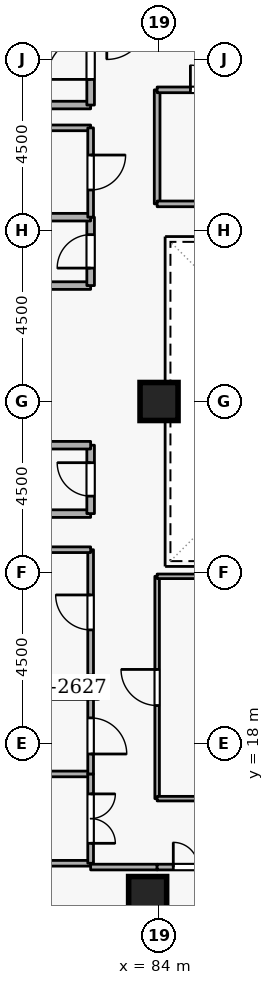
"""IFC4 building model, lengths in metres.
Left out: names, types, materials, properties, quantities, classifications, styles, units other than length and angle.
Written with IfcOpenShell. Run it as: python <this file> out.ifc"""

import sys

from ifc_helpers import new_model, si_unit, direction, frame, frame_2d, origin, origin_2d, place, context, subcontext, project, spatial, rectangle, extrude, element, fill, save


model = new_model("IFC4")
c1 = context("Model", 3, precision=1e-05, world=origin(), true_north=direction((0.0, 1.0)))
c2 = subcontext(c1, "Body", "Model", "MODEL_VIEW")
j1 = project(units=[si_unit("LENGTHUNIT", "METRE"), si_unit("PLANEANGLEUNIT", "RADIAN")], contexts=[c1])
p1 = place(None, origin())
s1 = spatial("IfcSite", under=j1, at=p1, CompositionType="ELEMENT")
p2 = place(p1, origin())
s2 = spatial("IfcBuilding", under=s1, at=p2, CompositionType="ELEMENT")
p3 = place(p2, frame((0.0, 0.0, 218.1)))
s3 = spatial("IfcBuildingStorey", under=s2, at=p3, CompositionType="ELEMENT", Elevation=218.1)
p4 = place(p3, frame((76.6, 19.45, 0.0), z_axis=(0.0, 0.0, 1.0), x_axis=(1.0, 0.0, 0.0)))
e1 = element("IfcWall", 1, at=p4, inside=s3, PredefinedType="SHEAR", context=c2, shape_type="SweptSolid", body=[
    extrude(rectangle(XDim=5.8, YDim=0.5, at=frame_2d((2.9, 0.0))), origin(), (0.0, 0.0, 1.0), 3.6),
])
for number, where, z_axis, x_axis in (
    (2, (83.7, 14.0, 0.0), (0.0, 0.0, 1.0), (1.0, 0.0, 0.0)),
    (3, (84.0, 27.0, 0.0), (0.0, 0.0, 1.0), (1.0, 0.0, 0.0)),
):
    element("IfcColumn", number, at=place(p3, frame(where, z_axis=z_axis, x_axis=x_axis)), inside=s3, PredefinedType="COLUMN", context=c2, shape_type="SweptSolid", body=[
        extrude(rectangle(XDim=1.0, YDim=1.0, at=origin_2d()), origin(), (0.0, 0.0, 1.0), 3.6),
    ])
p5 = place(p3, frame((79.9, 34.8, 0.0), z_axis=(0.0, 0.0, 1.0), x_axis=(1.0, 0.0, 0.0)))
e4 = element("IfcWall", 4, at=p5, inside=s3, PredefinedType="STANDARD", context=c2, shape_type="SweptSolid", body=[
    extrude(rectangle(XDim=2.3, YDim=0.2, at=frame_2d((1.15, 0.0))), origin(), (0.0, 0.0, 1.0), 2.465),
])
p6 = place(p3, frame((82.2, 34.8, 0.0), z_axis=(0.0, 0.0, 1.0), x_axis=(0.0, 1.0, 0.0)))
e5 = element("IfcWall", 5, at=p6, inside=s3, PredefinedType="STANDARD", context=c2, shape_type="SweptSolid", body=[
    extrude(rectangle(XDim=2.5, YDim=0.2, at=frame_2d((1.25, 0.0))), origin(), (0.0, 0.0, 1.0), 3.26),
])
p7 = place(p6, frame((0.675, 0.0, 0.0)))
e6 = element("IfcOpeningElement", 6, at=p7, cuts=e5, PredefinedType="OPENING", context=c2, shape_type="SweptSolid", body=[
    extrude(rectangle(XDim=1.15, YDim=2.1, at=frame_2d((0.575, 1.05))), frame((0.0, 0.11, 0.0), z_axis=(0.0, -1.0, 0.0), x_axis=(1.0, 0.0, 0.0)), (0.0, 0.0, 1.0), 0.22),
])
p8 = place(p3, frame((80.15, 24.05, 0.0), z_axis=(0.0, 0.0, 1.0), x_axis=(1.0, 0.0, 0.0)))
e7 = element("IfcWall", 7, at=p8, inside=s3, PredefinedType="STANDARD", context=c2, shape_type="SweptSolid", body=[
    extrude(rectangle(XDim=2.05, YDim=0.2, at=frame_2d((1.025, 0.0))), origin(), (0.0, 0.0, 1.0), 3.26),
])
p9 = place(p3, frame((82.2, 24.05, 0.0), z_axis=(0.0, 0.0, 1.0), x_axis=(0.0, 1.0, 0.0)))
e8 = element("IfcWall", 8, at=p9, inside=s3, PredefinedType="STANDARD", context=c2, shape_type="SweptSolid", body=[
    extrude(rectangle(XDim=1.8, YDim=0.2, at=frame_2d((0.9, 0.0))), origin(), (0.0, 0.0, 1.0), 3.26),
])
p10 = place(p9, frame((0.46, 0.0, 0.0)))
e9 = element("IfcOpeningElement", 9, at=p10, cuts=e8, PredefinedType="OPENING", context=c2, shape_type="SweptSolid", body=[
    extrude(rectangle(XDim=0.88, YDim=2.04, at=frame_2d((0.44, 1.02))), frame((0.0, 0.11, 0.0), z_axis=(0.0, -1.0, 0.0), x_axis=(1.0, 0.0, 0.0)), (0.0, 0.0, 1.0), 0.22),
])
for number, where, z_axis, x_axis in (
    (10, (82.2, 25.85, 0.0), (0.0, 0.0, 1.0), (-1.0, 0.0, 0.0)),
    (11, (80.15, 30.05, 0.0), (0.0, 0.0, 1.0), (1.0, 0.0, 0.0)),
):
    element("IfcWall", number, at=place(p3, frame(where, z_axis=z_axis, x_axis=x_axis)), inside=s3, PredefinedType="STANDARD", context=c2, shape_type="SweptSolid", body=[
        extrude(rectangle(XDim=2.05, YDim=0.2, at=frame_2d((1.025, 0.0))), origin(), (0.0, 0.0, 1.0), 3.26),
    ])
p11 = place(p3, frame((82.2, 30.05, 0.0), z_axis=(0.0, 0.0, 1.0), x_axis=(0.0, 1.0, 0.0)))
e12 = element("IfcWall", 12, at=p11, inside=s3, PredefinedType="STANDARD", context=c2, shape_type="SweptSolid", body=[
    extrude(rectangle(XDim=1.8, YDim=0.2, at=frame_2d((0.9, 0.0))), origin(), (0.0, 0.0, 1.0), 3.26),
])
p12 = place(p11, frame((0.46, 0.0, 0.0)))
e13 = element("IfcOpeningElement", 13, at=p12, cuts=e12, PredefinedType="OPENING", context=c2, shape_type="SweptSolid", body=[
    extrude(rectangle(XDim=0.88, YDim=2.04, at=frame_2d((0.44, 1.02))), frame((0.0, 0.11, 0.0), z_axis=(0.0, -1.0, 0.0), x_axis=(1.0, 0.0, 0.0)), (0.0, 0.0, 1.0), 0.22),
])
p13 = place(p3, frame((82.2, 31.85, 0.0), z_axis=(0.0, 0.0, 1.0), x_axis=(-1.0, 0.0, 0.0)))
e14 = element("IfcWall", 14, at=p13, inside=s3, PredefinedType="STANDARD", context=c2, shape_type="SweptSolid", body=[
    extrude(rectangle(XDim=2.05, YDim=0.2, at=frame_2d((1.025, 0.0))), origin(), (0.0, 0.0, 1.0), 3.26),
])
p14 = place(p3, frame((82.2, 19.8, 0.0), z_axis=(0.0, 0.0, 1.0), x_axis=(0.0, 1.0, 0.0)))
e15 = element("IfcWall", 15, at=p14, inside=s3, PredefinedType="PARTITIONING", context=c2, shape_type="SweptSolid", body=[
    extrude(rectangle(XDim=3.3, YDim=0.15, at=frame_2d((1.65, 0.0))), origin(), (0.0, 0.0, 1.0), 3.26),
])
p15 = place(p14, frame((1.19, 0.0, 0.0)))
e16 = element("IfcOpeningElement", 16, at=p15, cuts=e15, PredefinedType="OPENING", context=c2, shape_type="SweptSolid", body=[
    extrude(rectangle(XDim=0.92, YDim=2.08, at=frame_2d((0.46, 1.04))), frame((0.0, 0.085, 0.0), z_axis=(0.0, -1.0, 0.0), x_axis=(1.0, 0.0, 0.0)), (0.0, 0.0, 1.0), 0.17),
])
p16 = place(p3, frame((82.2, 23.1, 0.0), z_axis=(0.0, 0.0, 1.0), x_axis=(-1.0, 0.0, 0.0)))
e17 = element("IfcWall", 17, at=p16, inside=s3, PredefinedType="PARTITIONING", context=c2, shape_type="SweptSolid", body=[
    extrude(rectangle(XDim=2.05, YDim=0.15, at=frame_2d((1.025, 0.0))), origin(), (0.0, 0.0, 1.0), 3.26),
])
p17 = place(p3, frame((80.15, 34.2, 0.0), z_axis=(0.0, 0.0, 1.0), x_axis=(1.0, 0.0, 0.0)))
e18 = element("IfcWall", 18, at=p17, inside=s3, PredefinedType="PARTITIONING", context=c2, shape_type="SweptSolid", body=[
    extrude(rectangle(XDim=2.05, YDim=0.15, at=frame_2d((1.025, 0.0))), origin(), (0.0, 0.0, 1.0), 2.465),
])
p18 = place(p3, frame((82.2, 34.2, 0.0), z_axis=(0.0, 0.0, 1.0), x_axis=(0.0, -1.0, 0.0)))
e19 = element("IfcWall", 19, at=p18, inside=s3, PredefinedType="PARTITIONING", context=c2, shape_type="SweptSolid", body=[
    extrude(rectangle(XDim=2.35, YDim=0.15, at=frame_2d((1.175, 0.0))), origin(), (0.0, 0.0, 1.0), 3.26),
])
p19 = place(p18, frame((0.715, 0.0, 0.0)))
e20 = element("IfcOpeningElement", 20, at=p19, cuts=e19, PredefinedType="OPENING", context=c2, shape_type="SweptSolid", body=[
    extrude(rectangle(XDim=0.92, YDim=2.08, at=frame_2d((0.46, 1.04))), frame((0.0, 0.085, 0.0), z_axis=(0.0, -1.0, 0.0), x_axis=(1.0, 0.0, 0.0)), (0.0, 0.0, 1.0), 0.17),
])
for number, where, z_axis, x_axis in (
    (21, (82.2, 14.85, 0.0), (0.0, 0.0, 1.0), (-1.0, 0.0, 0.0)),
    (22, (64.78, 17.2, 0.0), (0.0, 0.0, 1.0), (1.0, 0.0, 0.0)),
):
    element("IfcWall", number, at=place(p3, frame(where, z_axis=z_axis, x_axis=x_axis)), inside=s3, PredefinedType="PARTITIONING", context=c2, shape_type="SweptSolid", body=[
        extrude(rectangle(XDim=17.42, YDim=0.15, at=frame_2d((8.71, 0.0))), origin(), (0.0, 0.0, 1.0), 3.26),
    ])
p20 = place(p3, frame((82.2, 17.2, 0.0), z_axis=(0.0, 0.0, 1.0), x_axis=(0.0, -1.0, 0.0)))
e23 = element("IfcWall", 23, at=p20, inside=s3, PredefinedType="PARTITIONING", context=c2, shape_type="SweptSolid", body=[
    extrude(rectangle(XDim=2.35, YDim=0.15, at=frame_2d((1.175, 0.0))), origin(), (0.0, 0.0, 1.0), 3.26),
])
p21 = place(p20, frame((0.525, 0.0, 0.0)))
e24 = element("IfcOpeningElement", 24, at=p21, cuts=e23, PredefinedType="OPENING", context=c2, shape_type="SweptSolid", body=[
    extrude(rectangle(XDim=1.3, YDim=2.12, at=frame_2d((0.65, 1.06))), frame((0.0, 0.085, 0.0), z_axis=(0.0, -1.0, 0.0), x_axis=(1.0, 0.0, 0.0)), (0.0, 0.0, 1.0), 0.17),
])
p22 = place(p3, frame((82.2, 19.2, 0.0), z_axis=(0.0, 0.0, 1.0), x_axis=(0.0, -1.0, 0.0)))
e25 = element("IfcWall", 25, at=p22, inside=s3, PredefinedType="PARTITIONING", context=c2, shape_type="SweptSolid", body=[
    extrude(rectangle(XDim=2.0, YDim=0.15, at=frame_2d((1.0, 0.0))), origin(), (0.0, 0.0, 1.0), 3.26),
])
p23 = place(p22, frame((0.525, 0.0, 0.0)))
e26 = element("IfcOpeningElement", 26, at=p23, cuts=e25, PredefinedType="OPENING", context=c2, shape_type="SweptSolid", body=[
    extrude(rectangle(XDim=0.95, YDim=2.1, at=frame_2d((0.475, 1.05))), frame((0.0, 0.085, 0.0), z_axis=(0.0, -1.0, 0.0), x_axis=(1.0, 0.0, 0.0)), (0.0, 0.0, 1.0), 0.17),
])
p24 = place(p3, frame((82.2, 14.75, 0.0), z_axis=(0.0, 0.0, 1.0), x_axis=(1.0, 0.0, 0.0)))
e27 = element("IfcWall", 27, at=p24, inside=s3, PredefinedType="PARTITIONING", context=c2, shape_type="SweptSolid", body=[
    extrude(rectangle(XDim=1.75, YDim=0.15, at=frame_2d((0.875, 0.0))), origin(), (0.0, 0.0, 1.0), 3.26),
])
p25 = place(p3, frame((83.95, 14.75, 0.0), z_axis=(0.0, 0.0, 1.0), x_axis=(1.0, 0.0, 0.0)))
e28 = element("IfcWall", 28, at=p25, inside=s3, PredefinedType="PARTITIONING", context=c2, shape_type="SweptSolid", body=[
    extrude(rectangle(XDim=2.15, YDim=0.15, at=frame_2d((1.075, 0.0))), origin(), (0.0, 0.0, 1.0), 3.26),
])
p26 = place(p25, frame((0.425, 0.0, 0.0)))
e29 = element("IfcOpeningElement", 29, at=p26, cuts=e28, PredefinedType="OPENING", context=c2, shape_type="SweptSolid", body=[
    extrude(rectangle(XDim=1.3, YDim=2.12, at=frame_2d((0.65, 1.06))), frame((0.0, 0.085, 0.0), z_axis=(0.0, -1.0, 0.0), x_axis=(1.0, 0.0, 0.0)), (0.0, 0.0, 1.0), 0.17),
])
p27 = place(p3, frame((83.95, 16.55, 0.0), z_axis=(0.0, 0.0, 1.0), x_axis=(0.0, 1.0, 0.0)))
e30 = element("IfcWall", 30, at=p27, inside=s3, PredefinedType="PARTITIONING", context=c2, shape_type="SweptSolid", body=[
    extrude(rectangle(XDim=5.85, YDim=0.12, at=frame_2d((2.925, 0.0))), origin(), (0.0, 0.0, 1.0), 3.26),
])
p28 = place(p27, frame((2.45, 0.0, 0.0)))
e31 = element("IfcOpeningElement", 31, at=p28, cuts=e30, PredefinedType="OPENING", context=c2, shape_type="SweptSolid", body=[
    extrude(rectangle(XDim=0.95, YDim=2.1, at=frame_2d((0.475, 1.05))), frame((0.0, 0.07, 0.0), z_axis=(0.0, -1.0, 0.0), x_axis=(1.0, 0.0, 0.0)), (0.0, 0.0, 1.0), 0.14),
])
for number, where, z_axis, x_axis in (
    (32, (83.95, 22.4, 0.0), (0.0, 0.0, 1.0), (1.0, 0.0, 0.0)),
    (33, (89.3, 16.55, 0.0), (0.0, 0.0, 1.0), (-1.0, 0.0, 0.0)),
):
    element("IfcWall", number, at=place(p3, frame(where, z_axis=z_axis, x_axis=x_axis)), inside=s3, PredefinedType="PARTITIONING", context=c2, shape_type="SweptSolid", body=[
        extrude(rectangle(XDim=5.35, YDim=0.12, at=frame_2d((2.675, 0.0))), origin(), (0.0, 0.0, 1.0), 3.26),
    ])
p29 = place(p3, frame((83.95, 32.2, 0.0), z_axis=(0.0, 0.0, 1.0), x_axis=(0.0, 1.0, 0.0)))
e34 = element("IfcWall", 34, at=p29, inside=s3, PredefinedType="PARTITIONING", context=c2, shape_type="SweptSolid", body=[
    extrude(rectangle(XDim=3.0, YDim=0.15, at=frame_2d((1.5, 0.0))), origin(), (0.0, 0.0, 1.0), 3.26),
])
p30 = place(p3, frame((83.95, 35.2, 0.0), z_axis=(0.0, 0.0, 1.0), x_axis=(1.0, 0.0, 0.0)))
e35 = element("IfcWall", 35, at=p30, inside=s3, PredefinedType="PARTITIONING", context=c2, shape_type="SweptSolid", body=[
    extrude(rectangle(XDim=3.05, YDim=0.15, at=frame_2d((1.525, 0.0))), origin(), (0.0, 0.0, 1.0), 3.26),
])
p31 = place(p30, frame((0.875, 0.0, 0.0)))
e36 = element("IfcOpeningElement", 36, at=p31, cuts=e35, PredefinedType="OPENING", context=c2, shape_type="SweptSolid", body=[
    extrude(rectangle(XDim=1.3, YDim=2.12, at=frame_2d((0.65, 1.06))), frame((0.0, 0.085, 0.0), z_axis=(0.0, -1.0, 0.0), x_axis=(1.0, 0.0, 0.0)), (0.0, 0.0, 1.0), 0.17),
])
p32 = place(p3, frame((87.0, 32.2, 0.0), z_axis=(0.0, 0.0, 1.0), x_axis=(-1.0, 0.0, 0.0)))
e37 = element("IfcWall", 37, at=p32, inside=s3, PredefinedType="PARTITIONING", context=c2, shape_type="SweptSolid", body=[
    extrude(rectangle(XDim=3.05, YDim=0.15, at=frame_2d((1.525, 0.0))), origin(), (0.0, 0.0, 1.0), 3.26),
])
p33 = place(p7, origin())
e38 = element("IfcDoor", 38, at=p33, inside=s3, OperationType="SINGLE_SWING_LEFT", PredefinedType="DOOR", context=c2, shape_type="SweptSolid", body=[
    extrude(rectangle(XDim=1.15, YDim=2.1, at=frame_2d((0.575, 1.05))), frame((0.0, 0.025, 0.0), z_axis=(0.0, -1.0, 0.0), x_axis=(1.0, 0.0, 0.0)), (0.0, 0.0, 1.0), 0.05),
])
fill(e6, e38)
p34 = place(p10, origin())
e39 = element("IfcDoor", 39, at=p34, inside=s3, OperationType="SINGLE_SWING_RIGHT", PredefinedType="DOOR", context=c2, shape_type="SweptSolid", body=[
    extrude(rectangle(XDim=0.88, YDim=2.04, at=frame_2d((0.44, 1.02))), frame((0.0, 0.025, 0.0), z_axis=(0.0, -1.0, 0.0), x_axis=(1.0, 0.0, 0.0)), (0.0, 0.0, 1.0), 0.05),
])
fill(e9, e39)
p35 = place(p12, origin())
e40 = element("IfcDoor", 40, at=p35, inside=s3, OperationType="SINGLE_SWING_LEFT", PredefinedType="DOOR", context=c2, shape_type="SweptSolid", body=[
    extrude(rectangle(XDim=0.88, YDim=2.04, at=frame_2d((0.44, 1.02))), frame((0.0, 0.025, 0.0), z_axis=(0.0, -1.0, 0.0), x_axis=(1.0, 0.0, 0.0)), (0.0, 0.0, 1.0), 0.05),
])
fill(e13, e40)
p36 = place(p15, origin())
e41 = element("IfcDoor", 41, at=p36, inside=s3, OperationType="SINGLE_SWING_RIGHT", PredefinedType="DOOR", context=c2, shape_type="SweptSolid", body=[
    extrude(rectangle(XDim=0.92, YDim=2.08, at=frame_2d((0.46, 1.04))), frame((0.0, 0.025, 0.0), z_axis=(0.0, -1.0, 0.0), x_axis=(1.0, 0.0, 0.0)), (0.0, 0.0, 1.0), 0.05),
])
fill(e16, e41)
p37 = place(p19, origin())
e42 = element("IfcDoor", 42, at=p37, inside=s3, OperationType="SINGLE_SWING_LEFT", PredefinedType="DOOR", context=c2, shape_type="SweptSolid", body=[
    extrude(rectangle(XDim=0.92, YDim=2.08, at=frame_2d((0.46, 1.04))), frame((0.0, 0.025, 0.0), z_axis=(0.0, -1.0, 0.0), x_axis=(1.0, 0.0, 0.0)), (0.0, 0.0, 1.0), 0.05),
])
fill(e20, e42)
p38 = place(p21, origin())
e43 = element("IfcDoor", 43, at=p38, inside=s3, OperationType="DOUBLE_DOOR_SINGLE_SWING", PredefinedType="DOOR", context=c2, shape_type="SweptSolid", body=[
    extrude(rectangle(XDim=1.3, YDim=2.12, at=frame_2d((0.65, 1.06))), frame((0.0, 0.025, 0.0), z_axis=(0.0, -1.0, 0.0), x_axis=(1.0, 0.0, 0.0)), (0.0, 0.0, 1.0), 0.05),
])
fill(e24, e43)
p39 = place(p23, origin())
e44 = element("IfcDoor", 44, at=p39, inside=s3, OperationType="SINGLE_SWING_RIGHT", PredefinedType="DOOR", context=c2, shape_type="SweptSolid", body=[
    extrude(rectangle(XDim=0.95, YDim=2.1, at=frame_2d((0.475, 1.05))), frame((0.0, 0.025, 0.0), z_axis=(0.0, -1.0, 0.0), x_axis=(1.0, 0.0, 0.0)), (0.0, 0.0, 1.0), 0.05),
])
fill(e26, e44)
p40 = place(p26, origin())
e45 = element("IfcDoor", 45, at=p40, inside=s3, OperationType="DOUBLE_DOOR_SINGLE_SWING", PredefinedType="DOOR", context=c2, shape_type="SweptSolid", body=[
    extrude(rectangle(XDim=1.3, YDim=2.12, at=frame_2d((0.65, 1.06))), frame((0.0, 0.025, 0.0), z_axis=(0.0, -1.0, 0.0), x_axis=(1.0, 0.0, 0.0)), (0.0, 0.0, 1.0), 0.05),
])
fill(e29, e45)
p41 = place(p28, origin())
e46 = element("IfcDoor", 46, at=p41, inside=s3, OperationType="SINGLE_SWING_RIGHT", PredefinedType="DOOR", context=c2, shape_type="SweptSolid", body=[
    extrude(rectangle(XDim=0.95, YDim=2.1, at=frame_2d((0.475, 1.05))), frame((0.0, 0.025, 0.0), z_axis=(0.0, -1.0, 0.0), x_axis=(1.0, 0.0, 0.0)), (0.0, 0.0, 1.0), 0.05),
])
fill(e31, e46)
p42 = place(p31, origin())
e47 = element("IfcDoor", 47, at=p42, inside=s3, OperationType="DOUBLE_DOOR_SINGLE_SWING", PredefinedType="DOOR", context=c2, shape_type="SweptSolid", body=[
    extrude(rectangle(XDim=1.3, YDim=2.12, at=frame_2d((0.65, 1.06))), frame((0.0, 0.025, 0.0), z_axis=(0.0, -1.0, 0.0), x_axis=(1.0, 0.0, 0.0)), (0.0, 0.0, 1.0), 0.05),
])
fill(e36, e47)
save(model, sys.argv[1])
